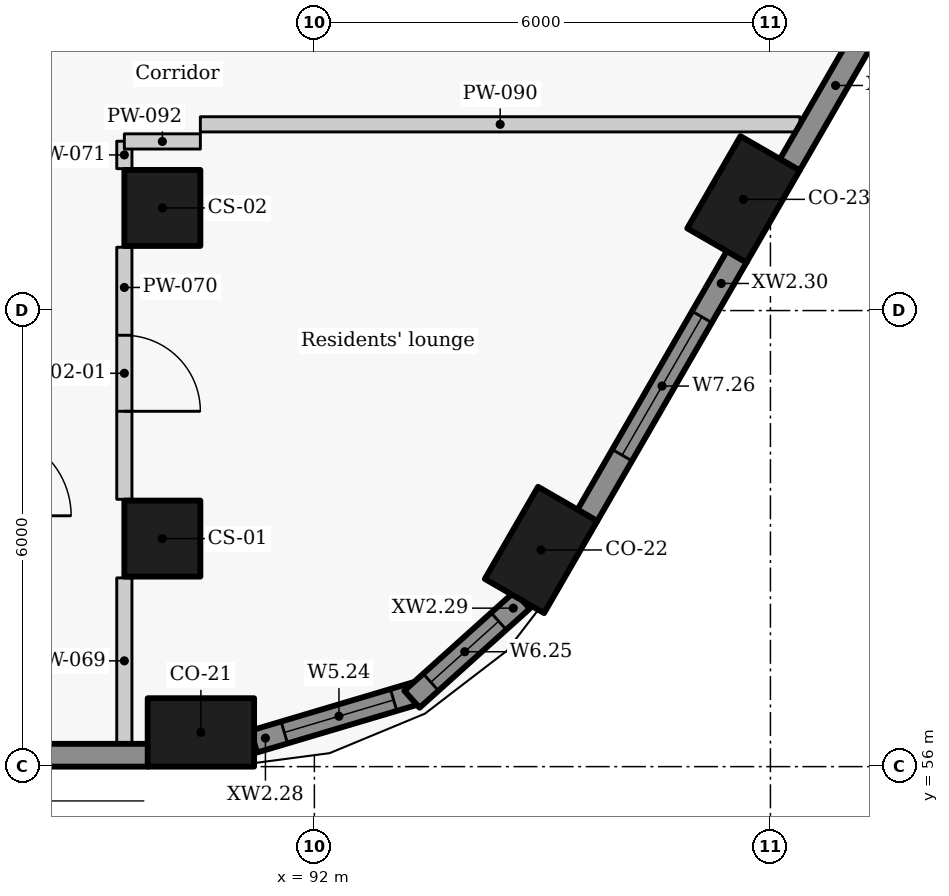
"""IFC4 building model, lengths in metres.
Left out: names, types, materials, properties, quantities, classifications, styles, units other than length and angle.
Written with IfcOpenShell. Run it as: python <this file> out.ifc"""

import sys

from ifc_helpers import new_model, si_unit, direction, frame, frame_2d, origin, origin_2d, place, context, subcontext, project, spatial, rectangle, extrude, element, fill, save


model = new_model("IFC4")
c1 = context("Model", 3, precision=1e-05, world=origin(), true_north=direction((0.0, 1.0)))
c2 = subcontext(c1, "Body", "Model", "MODEL_VIEW")
j1 = project(units=[si_unit("LENGTHUNIT", "METRE"), si_unit("PLANEANGLEUNIT", "RADIAN")], contexts=[c1])
p1 = place(None, origin())
s1 = spatial("IfcSite", under=j1, at=p1, CompositionType="ELEMENT")
p2 = place(p1, origin())
s2 = spatial("IfcBuilding", under=s1, at=p2, CompositionType="ELEMENT")
p3 = place(p2, frame((0.0, 0.0, 107.4)))
s3 = spatial("IfcBuildingStorey", under=s2, at=p3, CompositionType="ELEMENT", Elevation=107.4)
for number, where, z_axis, x_axis in (
    (1, (90.507, 56.45, 0.0), (0.0, 0.0, 1.0), (1.0, 0.0, 0.0)),
    (2, (94.982, 58.851, 0.0), (0.0, 0.0, 1.0), (0.5, 0.866, 0.0)),
    (3, (97.646, 63.463, 0.0), (0.0, 0.0, 1.0), (0.5, 0.866, 0.0)),
):
    element("IfcColumn", number, at=place(p3, frame(where, z_axis=z_axis, x_axis=x_axis)), inside=s3, PredefinedType="COLUMN", context=c2, shape_type="SweptSolid", body=[
        extrude(rectangle(XDim=1.4, YDim=0.9, at=origin_2d()), origin(), (0.0, 0.0, 1.0), 3.3),
    ])
for number, where, z_axis, x_axis in (
    (4, (90.0, 59.0, 0.0), (0.0, 0.0, 1.0), (0.0, 1.0, 0.0)),
    (5, (90.0, 63.35, 0.0), (0.0, 0.0, 1.0), (0.0, 1.0, 0.0)),
):
    element("IfcColumn", number, at=place(p3, frame(where, z_axis=z_axis, x_axis=x_axis)), inside=s3, PredefinedType="COLUMN", context=c2, shape_type="SweptSolid", body=[
        extrude(rectangle(XDim=1.0, YDim=1.0, at=origin_2d()), origin(), (0.0, 0.0, 1.0), 3.3),
    ])
p4 = place(p3, frame((69.871, 56.15, 0.0), z_axis=(0.0, 0.0, 1.0), x_axis=(1.0, 0.0, 0.0)))
e6 = element("IfcWall", 6, at=p4, inside=s3, PredefinedType="SOLIDWALL", context=c2, shape_type="SweptSolid", body=[
    extrude(rectangle(XDim=19.94, YDim=0.3, at=frame_2d((9.97, 0.0))), origin(), (0.0, 0.0, 1.0), 2.425),
])
p5 = place(p3, frame((91.203, 56.33, 0.0), z_axis=(0.0, 0.0, 1.0), x_axis=(0.95847736903, 0.285168604614, 0.0)))
e7 = element("IfcWall", 7, at=p5, inside=s3, PredefinedType="SOLIDWALL", context=c2, shape_type="SweptSolid", body=[
    extrude(rectangle(XDim=2.262, YDim=0.3, at=frame_2d((1.131, 0.0))), origin(), (0.0, 0.0, 1.0), 2.425),
])
p6 = place(p5, frame((0.419, 0.0, 0.9)))
e8 = element("IfcOpeningElement", 8, at=p6, cuts=e7, PredefinedType="OPENING", context=c2, shape_type="SweptSolid", body=[
    extrude(rectangle(XDim=1.5, YDim=1.1, at=frame_2d((0.75, 0.55))), frame((0.0, 0.16, 0.0), z_axis=(0.0, -1.0, 0.0), x_axis=(1.0, 0.0, 0.0)), (0.0, 0.0, 1.0), 0.32),
])
p7 = place(p3, frame((93.283, 56.887, 0.0), z_axis=(0.0, 0.0, 1.0), x_axis=(0.743785734967, 0.668418117992, 0.0)))
e9 = element("IfcWall", 9, at=p7, inside=s3, PredefinedType="SOLIDWALL", context=c2, shape_type="SweptSolid", body=[
    extrude(rectangle(XDim=1.95, YDim=0.3, at=frame_2d((0.975, 0.0))), origin(), (0.0, 0.0, 1.0), 2.425),
])
p8 = place(p7, frame((0.335, 0.0, 0.9)))
e10 = element("IfcOpeningElement", 10, at=p8, cuts=e9, PredefinedType="OPENING", context=c2, shape_type="SweptSolid", body=[
    extrude(rectangle(XDim=1.2, YDim=1.1, at=frame_2d((0.6, 0.55))), frame((0.0, 0.16, 0.0), z_axis=(0.0, -1.0, 0.0), x_axis=(1.0, 0.0, 0.0)), (0.0, 0.0, 1.0), 0.32),
])
p9 = place(p3, frame((95.59, 59.303, 0.0), z_axis=(0.0, 0.0, 1.0), x_axis=(0.500003583557, 0.866023334807, 0.0)))
e11 = element("IfcWall", 11, at=p9, inside=s3, PredefinedType="SOLIDWALL", context=c2, shape_type="SweptSolid", body=[
    extrude(rectangle(XDim=3.934, YDim=0.3, at=frame_2d((1.967, 0.0))), origin(), (0.0, 0.0, 1.0), 2.425),
])
p10 = place(p9, frame((0.917, 0.0, 0.9)))
e12 = element("IfcOpeningElement", 12, at=p10, cuts=e11, PredefinedType="OPENING", context=c2, shape_type="SweptSolid", body=[
    extrude(rectangle(XDim=2.1, YDim=1.1, at=frame_2d((1.05, 0.55))), frame((0.0, 0.16, 0.0), z_axis=(0.0, -1.0, 0.0), x_axis=(1.0, 0.0, 0.0)), (0.0, 0.0, 1.0), 0.32),
])
p11 = place(p3, frame((98.253, 63.916, 0.0), z_axis=(0.0, 0.0, 1.0), x_axis=(0.499957037901, 0.866050206543, 0.0)))
e13 = element("IfcWall", 13, at=p11, inside=s3, PredefinedType="SOLIDWALL", context=c2, shape_type="SweptSolid", body=[
    extrude(rectangle(XDim=3.934, YDim=0.3, at=frame_2d((1.967, 0.0))), origin(), (0.0, 0.0, 1.0), 2.425),
])
p12 = place(p11, frame((2.515, 0.0, 0.9)))
e14 = element("IfcOpeningElement", 14, at=p12, cuts=e13, PredefinedType="OPENING", context=c2, shape_type="SweptSolid", body=[
    extrude(rectangle(XDim=0.9, YDim=1.1, at=frame_2d((0.45, 0.55))), frame((0.0, 0.16, 0.0), z_axis=(0.0, -1.0, 0.0), x_axis=(1.0, 0.0, 0.0)), (0.0, 0.0, 1.0), 0.32),
])
p13 = place(p3, frame((89.5, 56.3, 0.0), z_axis=(0.0, 0.0, 1.0), x_axis=(0.0, 1.0, 0.0)))
e15 = element("IfcWall", 15, at=p13, inside=s3, PredefinedType="PARTITIONING", context=c2, shape_type="SweptSolid", body=[
    extrude(rectangle(XDim=2.183, YDim=0.2, at=frame_2d((1.091, 0.0))), origin(), (0.0, 0.0, 1.0), 3.025),
])
p14 = place(p3, frame((89.5, 62.833, 0.0), z_axis=(0.0, 0.0, 1.0), x_axis=(0.0, -1.0, 0.0)))
e16 = element("IfcWall", 16, at=p14, inside=s3, PredefinedType="PARTITIONING", context=c2, shape_type="SweptSolid", body=[
    extrude(rectangle(XDim=3.316, YDim=0.2, at=frame_2d((1.658, 0.0))), origin(), (0.0, 0.0, 1.0), 3.025),
])
p15 = place(p14, frame((1.158, 0.0, 0.0)))
e17 = element("IfcOpeningElement", 17, at=p15, cuts=e16, PredefinedType="OPENING", context=c2, shape_type="SweptSolid", body=[
    extrude(rectangle(XDim=1.0, YDim=2.1, at=frame_2d((0.5, 1.05))), frame((0.0, 0.11, 0.0), z_axis=(0.0, -1.0, 0.0), x_axis=(1.0, 0.0, 0.0)), (0.0, 0.0, 1.0), 0.22),
])
p16 = place(p3, frame((89.5, 63.867, 0.0), z_axis=(0.0, 0.0, 1.0), x_axis=(0.0, 1.0, 0.0)))
e18 = element("IfcWall", 18, at=p16, inside=s3, PredefinedType="PARTITIONING", context=c2, shape_type="SweptSolid", body=[
    extrude(rectangle(XDim=0.361, YDim=0.2, at=frame_2d((0.181, 0.0))), origin(), (0.0, 0.0, 1.0), 3.025),
])
p17 = place(p3, frame((90.5, 64.45, 0.0), z_axis=(0.0, 0.0, 1.0), x_axis=(1.0, 0.0, 0.0)))
e19 = element("IfcWall", 19, at=p17, inside=s3, PredefinedType="PARTITIONING", context=c2, shape_type="SweptSolid", body=[
    extrude(rectangle(XDim=7.889, YDim=0.2, at=frame_2d((3.944, 0.0))), origin(), (0.0, 0.0, 1.0), 2.405),
])
p18 = place(p3, frame((89.5, 64.225, 0.0), z_axis=(0.0, 0.0, 1.0), x_axis=(1.0, 0.0, 0.0)))
e20 = element("IfcWall", 20, at=p18, inside=s3, PredefinedType="PARTITIONING", context=c2, shape_type="SweptSolid", body=[
    extrude(rectangle(XDim=1.0, YDim=0.2, at=frame_2d((0.5, 0.0))), origin(), (0.0, 0.0, 1.0), 2.505),
])
p19 = place(p6, origin())
e21 = element("IfcWindow", 21, at=p19, inside=s3, PartitioningType="SINGLE_PANEL", PredefinedType="WINDOW", context=c2, shape_type="SweptSolid", body=[
    extrude(rectangle(XDim=1.5, YDim=1.1, at=frame_2d((0.75, 0.55))), frame((0.0, 0.03, 0.0), z_axis=(0.0, -1.0, 0.0), x_axis=(1.0, 0.0, 0.0)), (0.0, 0.0, 1.0), 0.06),
])
fill(e8, e21)
p20 = place(p8, origin())
e22 = element("IfcWindow", 22, at=p20, inside=s3, PartitioningType="SINGLE_PANEL", PredefinedType="WINDOW", context=c2, shape_type="SweptSolid", body=[
    extrude(rectangle(XDim=1.2, YDim=1.1, at=frame_2d((0.6, 0.55))), frame((0.0, 0.03, 0.0), z_axis=(0.0, -1.0, 0.0), x_axis=(1.0, 0.0, 0.0)), (0.0, 0.0, 1.0), 0.06),
])
fill(e10, e22)
p21 = place(p10, origin())
e23 = element("IfcWindow", 23, at=p21, inside=s3, PartitioningType="SINGLE_PANEL", PredefinedType="WINDOW", context=c2, shape_type="SweptSolid", body=[
    extrude(rectangle(XDim=2.1, YDim=1.1, at=frame_2d((1.05, 0.55))), frame((0.0, 0.03, 0.0), z_axis=(0.0, -1.0, 0.0), x_axis=(1.0, 0.0, 0.0)), (0.0, 0.0, 1.0), 0.06),
])
fill(e12, e23)
p22 = place(p15, origin())
e24 = element("IfcDoor", 24, at=p22, inside=s3, OperationType="SINGLE_SWING_RIGHT", PredefinedType="DOOR", context=c2, shape_type="SweptSolid", body=[
    extrude(rectangle(XDim=1.0, YDim=2.1, at=frame_2d((0.5, 1.05))), frame((0.0, 0.025, 0.0), z_axis=(0.0, -1.0, 0.0), x_axis=(1.0, 0.0, 0.0)), (0.0, 0.0, 1.0), 0.05),
])
fill(e17, e24)
save(model, sys.argv[1])
